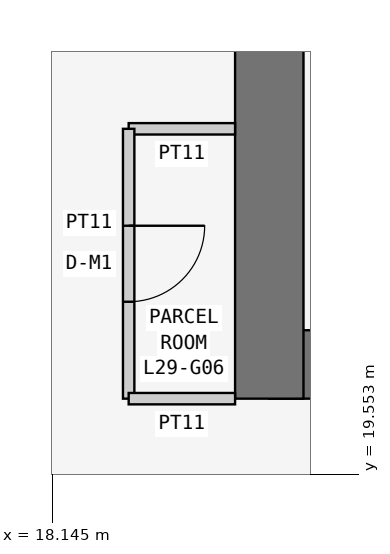
"""IFC4 building model, lengths in metres.
Left out: names, types, materials, properties, quantities, classifications, styles, units other than length and angle.
Written with IfcOpenShell. Run it as: python <this file> out.ifc"""

import sys

from ifc_helpers import new_model, si_unit, direction, frame, frame_2d, origin, place, context, subcontext, project, spatial, rectangle, extrude, element, fill, save


model = new_model("IFC4")
c1 = context("Model", 3, precision=1e-05, world=origin(), true_north=direction((0.0, 1.0)))
c2 = subcontext(c1, "Body", "Model", "MODEL_VIEW")
j1 = project(units=[si_unit("LENGTHUNIT", "METRE"), si_unit("PLANEANGLEUNIT", "RADIAN")], contexts=[c1])
p1 = place(None, origin())
s1 = spatial("IfcSite", under=j1, at=p1, CompositionType="ELEMENT")
p2 = place(p1, origin())
s2 = spatial("IfcBuilding", under=s1, at=p2, CompositionType="ELEMENT")
p3 = place(p2, frame((0.0, 0.0, 116.1)))
s3 = spatial("IfcBuildingStorey", under=s2, at=p3, CompositionType="ELEMENT", Elevation=116.1)
p4 = place(p3, frame((21.0, 21.0, 0.0), z_axis=(0.0, 0.0, 1.0), x_axis=(1.0, 0.0, 0.0)))
e1 = element("IfcWall", 1, at=p4, inside=s3, PredefinedType="SHEAR", context=c2, shape_type="SweptSolid", body=[
    extrude(rectangle(XDim=17.25, YDim=0.9, at=frame_2d((8.625, 0.0))), origin(), (0.0, 0.0, 1.0), 3.6),
])
p5 = place(p3, frame((21.0, 37.8, 0.0), z_axis=(0.0, 0.0, 1.0), x_axis=(0.0, -1.0, 0.0)))
e2 = element("IfcWall", 2, at=p5, inside=s3, PredefinedType="SHEAR", context=c2, shape_type="SweptSolid", body=[
    extrude(rectangle(XDim=17.25, YDim=0.9, at=frame_2d((8.625, 0.0))), origin(), (0.0, 0.0, 1.0), 3.6),
])
p6 = place(p5, frame((5.4, 0.0, 0.0)))
e3 = element("IfcOpeningElement", 3, at=p6, cuts=e2, PredefinedType="OPENING", context=c2, shape_type="SweptSolid", body=[
    extrude(rectangle(XDim=1.2, YDim=2.1, at=frame_2d((0.6, 1.05))), frame((0.0, 0.46, 0.0), z_axis=(0.0, -1.0, 0.0), x_axis=(1.0, 0.0, 0.0)), (0.0, 0.0, 1.0), 0.92),
])
p7 = place(p3, frame((20.55, 24.1, 0.0), z_axis=(0.0, 0.0, 1.0), x_axis=(-1.0, 0.0, 0.0)))
e4 = element("IfcWall", 4, at=p7, inside=s3, PredefinedType="PARTITIONING", context=c2, shape_type="SweptSolid", body=[
    extrude(rectangle(XDim=1.4, YDim=0.15, at=frame_2d((0.7, 0.0))), origin(), (0.0, 0.0, 1.0), 3.45),
])
p8 = place(p3, frame((19.15, 24.1, 0.0), z_axis=(0.0, 0.0, 1.0), x_axis=(0.0, -1.0, 0.0)))
e5 = element("IfcWall", 5, at=p8, inside=s3, PredefinedType="PARTITIONING", context=c2, shape_type="SweptSolid", body=[
    extrude(rectangle(XDim=3.55, YDim=0.15, at=frame_2d((1.775, 0.0))), origin(), (0.0, 0.0, 1.0), 3.45),
])
p9 = place(p8, frame((1.275, 0.0, 0.0)))
e6 = element("IfcOpeningElement", 6, at=p9, cuts=e5, PredefinedType="OPENING", context=c2, shape_type="SweptSolid", body=[
    extrude(rectangle(XDim=1.0, YDim=2.1, at=frame_2d((0.5, 1.05))), frame((0.0, 0.085, 0.0), z_axis=(0.0, -1.0, 0.0), x_axis=(1.0, 0.0, 0.0)), (0.0, 0.0, 1.0), 0.17),
])
p10 = place(p3, frame((19.15, 20.55, 0.0), z_axis=(0.0, 0.0, 1.0), x_axis=(1.0, 0.0, 0.0)))
e7 = element("IfcWall", 7, at=p10, inside=s3, PredefinedType="PARTITIONING", context=c2, shape_type="SweptSolid", body=[
    extrude(rectangle(XDim=1.4, YDim=0.15, at=frame_2d((0.7, 0.0))), origin(), (0.0, 0.0, 1.0), 3.45),
])
p11 = place(p9, origin())
e8 = element("IfcDoor", 8, at=p11, inside=s3, OperationType="SINGLE_SWING_LEFT", PredefinedType="DOOR", context=c2, shape_type="SweptSolid", body=[
    extrude(rectangle(XDim=1.0, YDim=2.1, at=frame_2d((0.5, 1.05))), frame((0.0, 0.025, 0.0), z_axis=(0.0, -1.0, 0.0), x_axis=(1.0, 0.0, 0.0)), (0.0, 0.0, 1.0), 0.05),
])
fill(e6, e8)
save(model, sys.argv[1])
